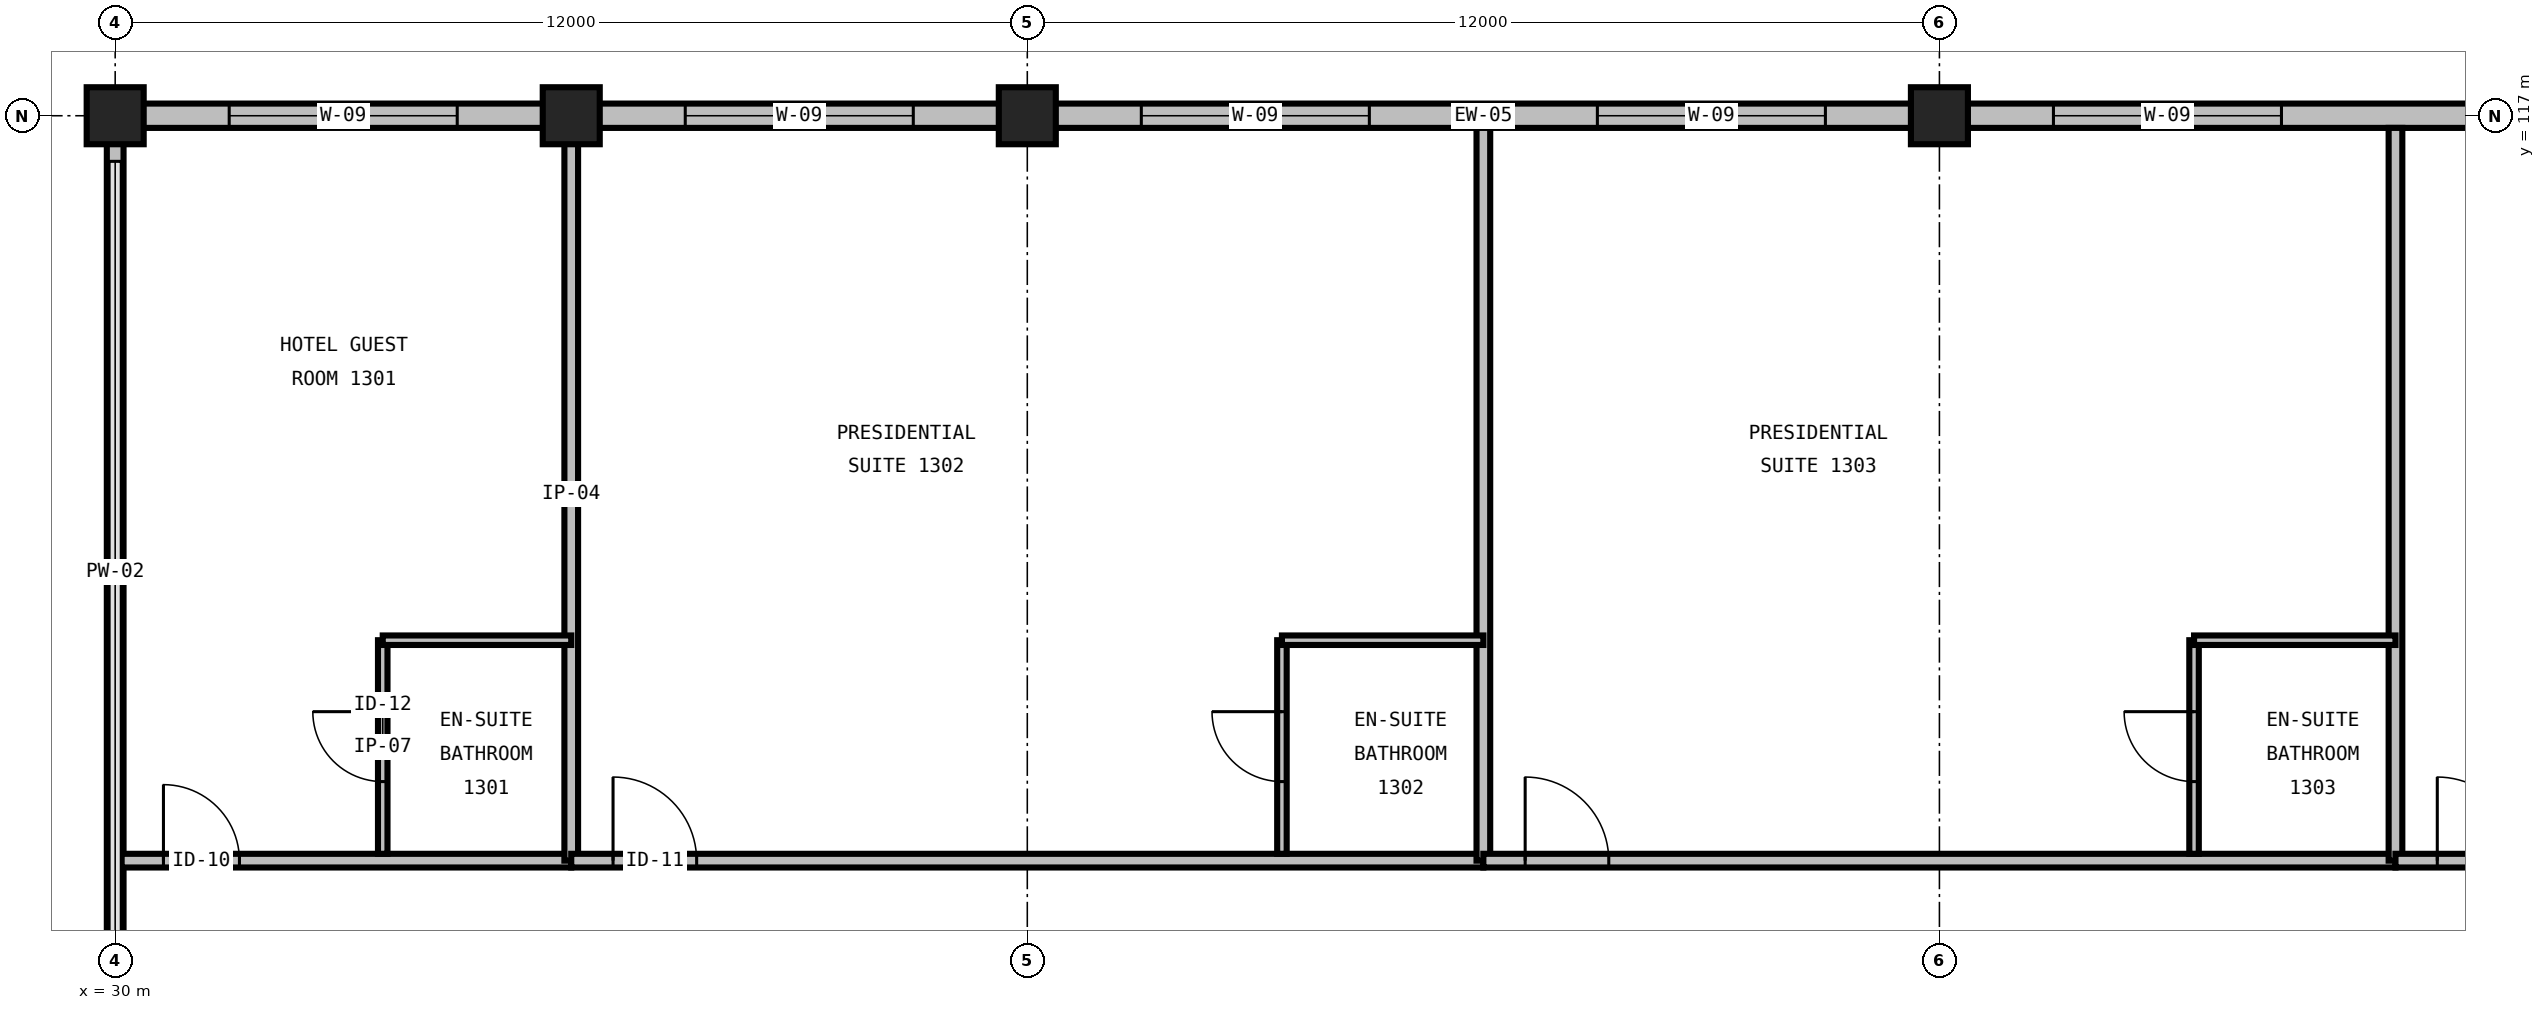
"""IFC4 building model, lengths in metres.
Left out: names, types, materials, properties, quantities, classifications, styles, units other than length and angle.
Written with IfcOpenShell. Run it as: python <this file> out.ifc"""

import sys

from ifc_helpers import new_model, si_unit, direction, frame, frame_2d, origin, origin_2d, place, context, subcontext, project, spatial, rectangle, extrude, element, fill, save


model = new_model("IFC4")
c1 = context("Model", 3, precision=1e-05, world=origin(), true_north=direction((0.0, 1.0)))
c2 = subcontext(c1, "Body", "Model", "MODEL_VIEW")
j1 = project(units=[si_unit("LENGTHUNIT", "METRE"), si_unit("PLANEANGLEUNIT", "RADIAN")], contexts=[c1])
p1 = place(None, origin())
s1 = spatial("IfcSite", under=j1, at=p1, CompositionType="ELEMENT")
p2 = place(p1, origin())
s2 = spatial("IfcBuilding", under=s1, at=p2, CompositionType="ELEMENT")
p3 = place(p2, frame((0.0, 0.0, 56.4)))
s3 = spatial("IfcBuildingStorey", under=s2, at=p3, CompositionType="ELEMENT", Elevation=56.4)
for number, where, z_axis, x_axis in (
    (1, (30.0, 117.0, 0.0), (0.0, 0.0, 1.0), (1.0, 0.0, 0.0)),
    (2, (36.0, 117.0, 0.0), (0.0, 0.0, 1.0), (1.0, 0.0, 0.0)),
    (3, (42.0, 117.0, 0.0), (0.0, 0.0, 1.0), (1.0, 0.0, 0.0)),
    (4, (54.0, 117.0, 0.0), (0.0, 0.0, 1.0), (1.0, 0.0, 0.0)),
):
    element("IfcColumn", number, at=place(p3, frame(where, z_axis=z_axis, x_axis=x_axis)), inside=s3, PredefinedType="COLUMN", context=c2, shape_type="SweptSolid", body=[
        extrude(rectangle(XDim=0.75, YDim=0.75, at=origin_2d()), origin(), (0.0, 0.0, 1.0), 3.6),
    ])
p4 = place(p3, frame((36.0, 117.0, 0.0), z_axis=(0.0, 0.0, 1.0), x_axis=(-1.0, 0.0, 0.0)))
e5 = element("IfcWall", 5, at=p4, inside=s3, PredefinedType="STANDARD", context=c2, shape_type="SweptSolid", body=[
    extrude(rectangle(XDim=6.0, YDim=0.32, at=frame_2d((3.0, 0.0))), origin(), (0.0, 0.0, 1.0), 2.536),
])
p5 = place(p4, frame((1.5, 0.0, 0.7)))
e6 = element("IfcOpeningElement", 6, at=p5, cuts=e5, PredefinedType="OPENING", context=c2, shape_type="SweptSolid", body=[
    extrude(rectangle(XDim=3.0, YDim=1.71, at=frame_2d((1.5, 0.855))), frame((0.0, 0.175, 0.0), z_axis=(0.0, -1.0, 0.0), x_axis=(1.0, 0.0, 0.0)), (0.0, 0.0, 1.0), 0.35),
])
p6 = place(p3, frame((42.0, 117.0, 0.0), z_axis=(0.0, 0.0, 1.0), x_axis=(-1.0, 0.0, 0.0)))
e7 = element("IfcWall", 7, at=p6, inside=s3, PredefinedType="STANDARD", context=c2, shape_type="SweptSolid", body=[
    extrude(rectangle(XDim=6.0, YDim=0.32, at=frame_2d((3.0, 0.0))), origin(), (0.0, 0.0, 1.0), 2.536),
])
p7 = place(p6, frame((1.5, 0.0, 0.7)))
e8 = element("IfcOpeningElement", 8, at=p7, cuts=e7, PredefinedType="OPENING", context=c2, shape_type="SweptSolid", body=[
    extrude(rectangle(XDim=3.0, YDim=1.71, at=frame_2d((1.5, 0.855))), frame((0.0, 0.175, 0.0), z_axis=(0.0, -1.0, 0.0), x_axis=(1.0, 0.0, 0.0)), (0.0, 0.0, 1.0), 0.35),
])
p8 = place(p3, frame((54.0, 117.0, 0.0), z_axis=(0.0, 0.0, 1.0), x_axis=(-1.0, 0.0, 0.0)))
e9 = element("IfcWall", 9, at=p8, inside=s3, PredefinedType="STANDARD", context=c2, shape_type="SweptSolid", body=[
    extrude(rectangle(XDim=12.0, YDim=0.32, at=frame_2d((6.0, 0.0))), origin(), (0.0, 0.0, 1.0), 2.536),
])
p9 = place(p8, frame((1.5, 0.0, 0.7)))
e10 = element("IfcOpeningElement", 10, at=p9, cuts=e9, PredefinedType="OPENING", context=c2, shape_type="SweptSolid", body=[
    extrude(rectangle(XDim=3.0, YDim=1.71, at=frame_2d((1.5, 0.855))), frame((0.0, 0.175, 0.0), z_axis=(0.0, -1.0, 0.0), x_axis=(1.0, 0.0, 0.0)), (0.0, 0.0, 1.0), 0.35),
])
p10 = place(p8, frame((7.5, 0.0, 0.7)))
e11 = element("IfcOpeningElement", 11, at=p10, cuts=e9, PredefinedType="OPENING", context=c2, shape_type="SweptSolid", body=[
    extrude(rectangle(XDim=3.0, YDim=1.71, at=frame_2d((1.5, 0.855))), frame((0.0, 0.175, 0.0), z_axis=(0.0, -1.0, 0.0), x_axis=(1.0, 0.0, 0.0)), (0.0, 0.0, 1.0), 0.35),
])
p11 = place(p3, frame((66.0, 117.0, 0.0), z_axis=(0.0, 0.0, 1.0), x_axis=(-1.0, 0.0, 0.0)))
e12 = element("IfcWall", 12, at=p11, inside=s3, PredefinedType="STANDARD", context=c2, shape_type="SweptSolid", body=[
    extrude(rectangle(XDim=12.0, YDim=0.32, at=frame_2d((6.0, 0.0))), origin(), (0.0, 0.0, 1.0), 2.536),
])
p12 = place(p11, frame((1.5, 0.0, 0.7)))
e13 = element("IfcOpeningElement", 13, at=p12, cuts=e12, PredefinedType="OPENING", context=c2, shape_type="SweptSolid", body=[
    extrude(rectangle(XDim=3.0, YDim=1.71, at=frame_2d((1.5, 0.855))), frame((0.0, 0.175, 0.0), z_axis=(0.0, -1.0, 0.0), x_axis=(1.0, 0.0, 0.0)), (0.0, 0.0, 1.0), 0.35),
])
p13 = place(p11, frame((7.5, 0.0, 0.7)))
e14 = element("IfcOpeningElement", 14, at=p13, cuts=e12, PredefinedType="OPENING", context=c2, shape_type="SweptSolid", body=[
    extrude(rectangle(XDim=3.0, YDim=1.71, at=frame_2d((1.5, 0.855))), frame((0.0, 0.175, 0.0), z_axis=(0.0, -1.0, 0.0), x_axis=(1.0, 0.0, 0.0)), (0.0, 0.0, 1.0), 0.35),
])
p14 = place(p3, frame((30.0, 117.0, 0.0), z_axis=(0.0, 0.0, 1.0), x_axis=(0.0, -1.0, 0.0)))
e15 = element("IfcWall", 15, at=p14, inside=s3, PredefinedType="PARAPET", context=c2, shape_type="SweptSolid", body=[
    extrude(rectangle(XDim=12.0, YDim=0.22, at=frame_2d((6.0, 0.0))), origin(), (0.0, 0.0, 1.0), 0.2),
])
p15 = place(p3, frame((30.085, 107.2, 0.0), z_axis=(0.0, 0.0, 1.0), x_axis=(1.0, 0.0, 0.0)))
e16 = element("IfcWall", 16, at=p15, inside=s3, PredefinedType="PARTITIONING", context=c2, shape_type="SweptSolid", body=[
    extrude(rectangle(XDim=5.915, YDim=0.18, at=frame_2d((2.957, 0.0))), origin(), (0.0, 0.0, 1.0), 3.29),
])
p16 = place(p15, frame((0.55, 0.0, 0.0)))
e17 = element("IfcOpeningElement", 17, at=p16, cuts=e16, PredefinedType="OPENING", context=c2, shape_type="SweptSolid", body=[
    extrude(rectangle(XDim=1.0, YDim=2.15, at=frame_2d((0.5, 1.075))), frame((0.0, 0.105, 0.0), z_axis=(0.0, -1.0, 0.0), x_axis=(1.0, 0.0, 0.0)), (0.0, 0.0, 1.0), 0.21),
])
p17 = place(p3, frame((36.0, 107.2, 0.0), z_axis=(0.0, 0.0, 1.0), x_axis=(0.0, 1.0, 0.0)))
e18 = element("IfcWall", 18, at=p17, inside=s3, PredefinedType="PARTITIONING", context=c2, shape_type="SweptSolid", body=[
    extrude(rectangle(XDim=9.64, YDim=0.18, at=frame_2d((4.82, 0.0))), origin(), (0.0, 0.0, 1.0), 2.59),
])
p18 = place(p3, frame((33.52, 107.29, 0.0), z_axis=(0.0, 0.0, 1.0), x_axis=(0.0, 1.0, 0.0)))
e19 = element("IfcWall", 19, at=p18, inside=s3, PredefinedType="PARTITIONING", context=c2, shape_type="SweptSolid", body=[
    extrude(rectangle(XDim=2.81, YDim=0.125, at=frame_2d((1.405, 0.0))), origin(), (0.0, 0.0, 1.0), 3.29),
])
p19 = place(p18, frame((0.95, 0.0, 0.0)))
e20 = element("IfcOpeningElement", 20, at=p19, cuts=e19, PredefinedType="OPENING", context=c2, shape_type="SweptSolid", body=[
    extrude(rectangle(XDim=0.92, YDim=2.1, at=frame_2d((0.46, 1.05))), frame((0.0, 0.077, 0.0), z_axis=(0.0, -1.0, 0.0), x_axis=(1.0, 0.0, 0.0)), (0.0, 0.0, 1.0), 0.155),
])
p20 = place(p3, frame((33.52, 110.1, 0.0), z_axis=(0.0, 0.0, 1.0), x_axis=(1.0, 0.0, 0.0)))
e21 = element("IfcWall", 21, at=p20, inside=s3, PredefinedType="PARTITIONING", context=c2, shape_type="SweptSolid", body=[
    extrude(rectangle(XDim=2.48, YDim=0.125, at=frame_2d((1.24, 0.0))), origin(), (0.0, 0.0, 1.0), 3.29),
])
p21 = place(p3, frame((36.0, 107.2, 0.0), z_axis=(0.0, 0.0, 1.0), x_axis=(1.0, 0.0, 0.0)))
e22 = element("IfcWall", 22, at=p21, inside=s3, PredefinedType="PARTITIONING", context=c2, shape_type="SweptSolid", body=[
    extrude(rectangle(XDim=12.0, YDim=0.18, at=frame_2d((6.0, 0.0))), origin(), (0.0, 0.0, 1.0), 3.29),
])
p22 = place(p21, frame((0.55, 0.0, 0.0)))
e23 = element("IfcOpeningElement", 23, at=p22, cuts=e22, PredefinedType="OPENING", context=c2, shape_type="SweptSolid", body=[
    extrude(rectangle(XDim=1.1, YDim=2.2, at=frame_2d((0.55, 1.1))), frame((0.0, 0.105, 0.0), z_axis=(0.0, -1.0, 0.0), x_axis=(1.0, 0.0, 0.0)), (0.0, 0.0, 1.0), 0.21),
])
p23 = place(p3, frame((48.0, 107.2, 0.0), z_axis=(0.0, 0.0, 1.0), x_axis=(0.0, 1.0, 0.0)))
e24 = element("IfcWall", 24, at=p23, inside=s3, PredefinedType="PARTITIONING", context=c2, shape_type="SweptSolid", body=[
    extrude(rectangle(XDim=9.64, YDim=0.18, at=frame_2d((4.82, 0.0))), origin(), (0.0, 0.0, 1.0), 3.29),
])
p24 = place(p3, frame((45.35, 107.29, 0.0), z_axis=(0.0, 0.0, 1.0), x_axis=(0.0, 1.0, 0.0)))
e25 = element("IfcWall", 25, at=p24, inside=s3, PredefinedType="PARTITIONING", context=c2, shape_type="SweptSolid", body=[
    extrude(rectangle(XDim=2.81, YDim=0.125, at=frame_2d((1.405, 0.0))), origin(), (0.0, 0.0, 1.0), 3.29),
])
p25 = place(p24, frame((0.95, 0.0, 0.0)))
e26 = element("IfcOpeningElement", 26, at=p25, cuts=e25, PredefinedType="OPENING", context=c2, shape_type="SweptSolid", body=[
    extrude(rectangle(XDim=0.92, YDim=2.1, at=frame_2d((0.46, 1.05))), frame((0.0, 0.077, 0.0), z_axis=(0.0, -1.0, 0.0), x_axis=(1.0, 0.0, 0.0)), (0.0, 0.0, 1.0), 0.155),
])
p26 = place(p3, frame((45.35, 110.1, 0.0), z_axis=(0.0, 0.0, 1.0), x_axis=(1.0, 0.0, 0.0)))
e27 = element("IfcWall", 27, at=p26, inside=s3, PredefinedType="PARTITIONING", context=c2, shape_type="SweptSolid", body=[
    extrude(rectangle(XDim=2.65, YDim=0.125, at=frame_2d((1.325, 0.0))), origin(), (0.0, 0.0, 1.0), 3.29),
])
p27 = place(p3, frame((48.0, 107.2, 0.0), z_axis=(0.0, 0.0, 1.0), x_axis=(1.0, 0.0, 0.0)))
e28 = element("IfcWall", 28, at=p27, inside=s3, PredefinedType="PARTITIONING", context=c2, shape_type="SweptSolid", body=[
    extrude(rectangle(XDim=12.0, YDim=0.18, at=frame_2d((6.0, 0.0))), origin(), (0.0, 0.0, 1.0), 3.29),
])
p28 = place(p27, frame((0.55, 0.0, 0.0)))
e29 = element("IfcOpeningElement", 29, at=p28, cuts=e28, PredefinedType="OPENING", context=c2, shape_type="SweptSolid", body=[
    extrude(rectangle(XDim=1.1, YDim=2.2, at=frame_2d((0.55, 1.1))), frame((0.0, 0.105, 0.0), z_axis=(0.0, -1.0, 0.0), x_axis=(1.0, 0.0, 0.0)), (0.0, 0.0, 1.0), 0.21),
])
p29 = place(p3, frame((60.0, 107.2, 0.0), z_axis=(0.0, 0.0, 1.0), x_axis=(0.0, 1.0, 0.0)))
e30 = element("IfcWall", 30, at=p29, inside=s3, PredefinedType="PARTITIONING", context=c2, shape_type="SweptSolid", body=[
    extrude(rectangle(XDim=9.64, YDim=0.18, at=frame_2d((4.82, 0.0))), origin(), (0.0, 0.0, 1.0), 3.29),
])
p30 = place(p3, frame((57.35, 107.29, 0.0), z_axis=(0.0, 0.0, 1.0), x_axis=(0.0, 1.0, 0.0)))
e31 = element("IfcWall", 31, at=p30, inside=s3, PredefinedType="PARTITIONING", context=c2, shape_type="SweptSolid", body=[
    extrude(rectangle(XDim=2.81, YDim=0.125, at=frame_2d((1.405, 0.0))), origin(), (0.0, 0.0, 1.0), 3.29),
])
p31 = place(p30, frame((0.95, 0.0, 0.0)))
e32 = element("IfcOpeningElement", 32, at=p31, cuts=e31, PredefinedType="OPENING", context=c2, shape_type="SweptSolid", body=[
    extrude(rectangle(XDim=0.92, YDim=2.1, at=frame_2d((0.46, 1.05))), frame((0.0, 0.077, 0.0), z_axis=(0.0, -1.0, 0.0), x_axis=(1.0, 0.0, 0.0)), (0.0, 0.0, 1.0), 0.155),
])
p32 = place(p3, frame((57.35, 110.1, 0.0), z_axis=(0.0, 0.0, 1.0), x_axis=(1.0, 0.0, 0.0)))
e33 = element("IfcWall", 33, at=p32, inside=s3, PredefinedType="PARTITIONING", context=c2, shape_type="SweptSolid", body=[
    extrude(rectangle(XDim=2.65, YDim=0.125, at=frame_2d((1.325, 0.0))), origin(), (0.0, 0.0, 1.0), 3.29),
])
p33 = place(p3, frame((60.0, 107.2, 0.0), z_axis=(0.0, 0.0, 1.0), x_axis=(1.0, 0.0, 0.0)))
e34 = element("IfcWall", 34, at=p33, inside=s3, PredefinedType="PARTITIONING", context=c2, shape_type="SweptSolid", body=[
    extrude(rectangle(XDim=12.0, YDim=0.18, at=frame_2d((6.0, 0.0))), origin(), (0.0, 0.0, 1.0), 3.29),
])
p34 = place(p33, frame((0.55, 0.0, 0.0)))
e35 = element("IfcOpeningElement", 35, at=p34, cuts=e34, PredefinedType="OPENING", context=c2, shape_type="SweptSolid", body=[
    extrude(rectangle(XDim=1.1, YDim=2.2, at=frame_2d((0.55, 1.1))), frame((0.0, 0.105, 0.0), z_axis=(0.0, -1.0, 0.0), x_axis=(1.0, 0.0, 0.0)), (0.0, 0.0, 1.0), 0.21),
])
p35 = place(p5, origin())
e36 = element("IfcWindow", 36, at=p35, inside=s3, PartitioningType="TRIPLE_PANEL_VERTICAL", PredefinedType="WINDOW", context=c2, shape_type="SweptSolid", body=[
    extrude(rectangle(XDim=3.0, YDim=1.71, at=frame_2d((1.5, 0.855))), frame((0.0, 0.03, 0.0), z_axis=(0.0, -1.0, 0.0), x_axis=(1.0, 0.0, 0.0)), (0.0, 0.0, 1.0), 0.06),
])
fill(e6, e36)
p36 = place(p7, origin())
e37 = element("IfcWindow", 37, at=p36, inside=s3, PartitioningType="TRIPLE_PANEL_VERTICAL", PredefinedType="WINDOW", context=c2, shape_type="SweptSolid", body=[
    extrude(rectangle(XDim=3.0, YDim=1.71, at=frame_2d((1.5, 0.855))), frame((0.0, 0.03, 0.0), z_axis=(0.0, -1.0, 0.0), x_axis=(1.0, 0.0, 0.0)), (0.0, 0.0, 1.0), 0.06),
])
fill(e8, e37)
p37 = place(p9, origin())
e38 = element("IfcWindow", 38, at=p37, inside=s3, PartitioningType="TRIPLE_PANEL_VERTICAL", PredefinedType="WINDOW", context=c2, shape_type="SweptSolid", body=[
    extrude(rectangle(XDim=3.0, YDim=1.71, at=frame_2d((1.5, 0.855))), frame((0.0, 0.03, 0.0), z_axis=(0.0, -1.0, 0.0), x_axis=(1.0, 0.0, 0.0)), (0.0, 0.0, 1.0), 0.06),
])
fill(e10, e38)
p38 = place(p10, origin())
e39 = element("IfcWindow", 39, at=p38, inside=s3, PartitioningType="TRIPLE_PANEL_VERTICAL", PredefinedType="WINDOW", context=c2, shape_type="SweptSolid", body=[
    extrude(rectangle(XDim=3.0, YDim=1.71, at=frame_2d((1.5, 0.855))), frame((0.0, 0.03, 0.0), z_axis=(0.0, -1.0, 0.0), x_axis=(1.0, 0.0, 0.0)), (0.0, 0.0, 1.0), 0.06),
])
fill(e11, e39)
p39 = place(p13, origin())
e40 = element("IfcWindow", 40, at=p39, inside=s3, PartitioningType="TRIPLE_PANEL_VERTICAL", PredefinedType="WINDOW", context=c2, shape_type="SweptSolid", body=[
    extrude(rectangle(XDim=3.0, YDim=1.71, at=frame_2d((1.5, 0.855))), frame((0.0, 0.03, 0.0), z_axis=(0.0, -1.0, 0.0), x_axis=(1.0, 0.0, 0.0)), (0.0, 0.0, 1.0), 0.06),
])
fill(e14, e40)
p40 = place(p16, origin())
e41 = element("IfcDoor", 41, at=p40, inside=s3, OperationType="SINGLE_SWING_LEFT", PredefinedType="DOOR", context=c2, shape_type="SweptSolid", body=[
    extrude(rectangle(XDim=1.0, YDim=2.15, at=frame_2d((0.5, 1.075))), frame((0.0, 0.025, 0.0), z_axis=(0.0, -1.0, 0.0), x_axis=(1.0, 0.0, 0.0)), (0.0, 0.0, 1.0), 0.05),
])
fill(e17, e41)
p41 = place(p19, origin())
e42 = element("IfcDoor", 42, at=p41, inside=s3, OperationType="SINGLE_SWING_RIGHT", PredefinedType="DOOR", context=c2, shape_type="SweptSolid", body=[
    extrude(rectangle(XDim=0.92, YDim=2.1, at=frame_2d((0.46, 1.05))), frame((0.0, 0.025, 0.0), z_axis=(0.0, -1.0, 0.0), x_axis=(1.0, 0.0, 0.0)), (0.0, 0.0, 1.0), 0.05),
])
fill(e20, e42)
p42 = place(p22, origin())
e43 = element("IfcDoor", 43, at=p42, inside=s3, OperationType="SINGLE_SWING_LEFT", PredefinedType="DOOR", context=c2, shape_type="SweptSolid", body=[
    extrude(rectangle(XDim=1.1, YDim=2.2, at=frame_2d((0.55, 1.1))), frame((0.0, 0.025, 0.0), z_axis=(0.0, -1.0, 0.0), x_axis=(1.0, 0.0, 0.0)), (0.0, 0.0, 1.0), 0.05),
])
fill(e23, e43)
p43 = place(p25, origin())
e44 = element("IfcDoor", 44, at=p43, inside=s3, OperationType="SINGLE_SWING_RIGHT", PredefinedType="DOOR", context=c2, shape_type="SweptSolid", body=[
    extrude(rectangle(XDim=0.92, YDim=2.1, at=frame_2d((0.46, 1.05))), frame((0.0, 0.025, 0.0), z_axis=(0.0, -1.0, 0.0), x_axis=(1.0, 0.0, 0.0)), (0.0, 0.0, 1.0), 0.05),
])
fill(e26, e44)
p44 = place(p28, origin())
e45 = element("IfcDoor", 45, at=p44, inside=s3, OperationType="SINGLE_SWING_LEFT", PredefinedType="DOOR", context=c2, shape_type="SweptSolid", body=[
    extrude(rectangle(XDim=1.1, YDim=2.2, at=frame_2d((0.55, 1.1))), frame((0.0, 0.025, 0.0), z_axis=(0.0, -1.0, 0.0), x_axis=(1.0, 0.0, 0.0)), (0.0, 0.0, 1.0), 0.05),
])
fill(e29, e45)
p45 = place(p31, origin())
e46 = element("IfcDoor", 46, at=p45, inside=s3, OperationType="SINGLE_SWING_RIGHT", PredefinedType="DOOR", context=c2, shape_type="SweptSolid", body=[
    extrude(rectangle(XDim=0.92, YDim=2.1, at=frame_2d((0.46, 1.05))), frame((0.0, 0.025, 0.0), z_axis=(0.0, -1.0, 0.0), x_axis=(1.0, 0.0, 0.0)), (0.0, 0.0, 1.0), 0.05),
])
fill(e32, e46)
p46 = place(p34, origin())
e47 = element("IfcDoor", 47, at=p46, inside=s3, OperationType="SINGLE_SWING_LEFT", PredefinedType="DOOR", context=c2, shape_type="SweptSolid", body=[
    extrude(rectangle(XDim=1.1, YDim=2.2, at=frame_2d((0.55, 1.1))), frame((0.0, 0.025, 0.0), z_axis=(0.0, -1.0, 0.0), x_axis=(1.0, 0.0, 0.0)), (0.0, 0.0, 1.0), 0.05),
])
fill(e35, e47)
save(model, sys.argv[1])
